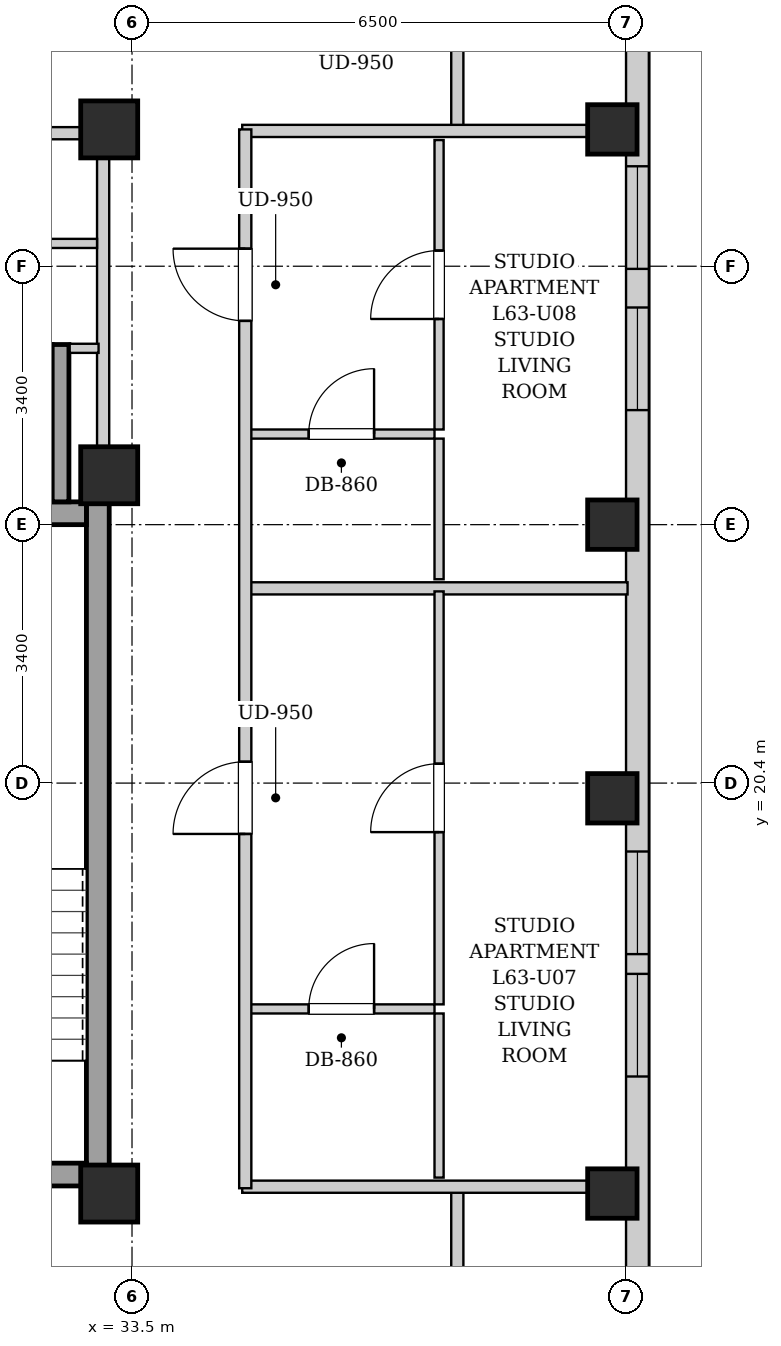
"""IFC4 building model, lengths in metres.
Left out: names, types, materials, properties, quantities, classifications, styles, units other than length and angle.
Written with IfcOpenShell. Run it as: python <this file> out.ifc"""

import sys

from ifc_helpers import new_model, si_unit, direction, frame, frame_2d, origin, origin_2d, place, context, subcontext, project, spatial, rectangle, extrude, element, fill, save


model = new_model("IFC4")
c1 = context("Model", 3, precision=1e-05, world=origin(), true_north=direction((0.0, 1.0)))
c2 = subcontext(c1, "Body", "Model", "MODEL_VIEW")
j1 = project(units=[si_unit("LENGTHUNIT", "METRE"), si_unit("PLANEANGLEUNIT", "RADIAN")], contexts=[c1])
p1 = place(None, origin())
s1 = spatial("IfcSite", under=j1, at=p1, CompositionType="ELEMENT")
p2 = place(p1, origin())
s2 = spatial("IfcBuilding", under=s1, at=p2, CompositionType="ELEMENT")
p3 = place(p2, frame((0.0, 0.0, 217.3)))
s3 = spatial("IfcBuildingStorey", under=s2, at=p3, CompositionType="ELEMENT", Elevation=217.3)
for number, where, z_axis, x_axis in (
    (1, (39.82, 15.0, 0.0), (0.0, 0.0, 1.0), (1.0, 0.0, 0.0)),
    (2, (39.82, 20.2, 0.0), (0.0, 0.0, 1.0), (1.0, 0.0, 0.0)),
    (3, (39.82, 23.8, 0.0), (0.0, 0.0, 1.0), (1.0, 0.0, 0.0)),
    (4, (39.82, 29.0, 0.0), (0.0, 0.0, 1.0), (1.0, 0.0, 0.0)),
):
    element("IfcColumn", number, at=place(p3, frame(where, z_axis=z_axis, x_axis=x_axis)), inside=s3, PredefinedType="COLUMN", context=c2, shape_type="SweptSolid", body=[
        extrude(rectangle(XDim=0.65, YDim=0.65, at=origin_2d()), origin(), (0.0, 0.0, 1.0), 3.4),
    ])
for number, where, z_axis, x_axis in (
    (5, (33.2, 15.0, 0.0), (0.0, 0.0, 1.0), (1.0, 0.0, 0.0)),
    (6, (33.2, 29.0, 0.0), (0.0, 0.0, 1.0), (1.0, 0.0, 0.0)),
    (7, (33.2, 24.45, 0.0), (0.0, 0.0, 1.0), (1.0, 0.0, 0.0)),
):
    element("IfcColumn", number, at=place(p3, frame(where, z_axis=z_axis, x_axis=x_axis)), inside=s3, PredefinedType="COLUMN", context=c2, shape_type="SweptSolid", body=[
        extrude(rectangle(XDim=0.75, YDim=0.75, at=origin_2d()), origin(), (0.0, 0.0, 1.0), 3.4),
    ])
p4 = place(p3, frame((40.15, 37.7, 0.0), z_axis=(0.0, 0.0, 1.0), x_axis=(0.0, -1.0, 0.0)))
e8 = element("IfcWall", 8, at=p4, inside=s3, PredefinedType="SOLIDWALL", context=c2, shape_type="SweptSolid", body=[
    extrude(rectangle(XDim=31.4, YDim=0.3, at=frame_2d((15.7, 0.0))), origin(), (0.0, 0.0, 1.0), 3.14),
])
p5 = place(p4, frame((28.546, 0.0, 0.55)))
e9 = element("IfcOpeningElement", 9, at=p5, cuts=e8, PredefinedType="OPENING", context=c2, shape_type="SweptSolid", body=[
    extrude(rectangle(XDim=1.35, YDim=1.2, at=frame_2d((0.675, 0.6))), frame((0.0, 0.16, 0.0), z_axis=(0.0, -1.0, 0.0), x_axis=(1.0, 0.0, 0.0)), (0.0, 0.0, 1.0), 0.32),
])
p6 = place(p4, frame((1.504, 0.0, 0.55)))
e10 = element("IfcOpeningElement", 10, at=p6, cuts=e8, PredefinedType="OPENING", context=c2, shape_type="SweptSolid", body=[
    extrude(rectangle(XDim=1.35, YDim=1.2, at=frame_2d((0.675, 0.6))), frame((0.0, 0.16, 0.0), z_axis=(0.0, -1.0, 0.0), x_axis=(1.0, 0.0, 0.0)), (0.0, 0.0, 1.0), 0.32),
])
p7 = place(p4, frame((18.2, 0.0, 0.55)))
e11 = element("IfcOpeningElement", 11, at=p7, cuts=e8, PredefinedType="OPENING", context=c2, shape_type="SweptSolid", body=[
    extrude(rectangle(XDim=1.35, YDim=1.2, at=frame_2d((0.675, 0.6))), frame((0.0, 0.16, 0.0), z_axis=(0.0, -1.0, 0.0), x_axis=(1.0, 0.0, 0.0)), (0.0, 0.0, 1.0), 0.32),
])
p8 = place(p4, frame((19.81, 0.0, 0.55)))
e12 = element("IfcOpeningElement", 12, at=p8, cuts=e8, PredefinedType="OPENING", context=c2, shape_type="SweptSolid", body=[
    extrude(rectangle(XDim=1.35, YDim=1.2, at=frame_2d((0.675, 0.6))), frame((0.0, 0.16, 0.0), z_axis=(0.0, -1.0, 0.0), x_axis=(1.0, 0.0, 0.0)), (0.0, 0.0, 1.0), 0.32),
])
p9 = place(p4, frame((11.043, 0.0, 0.55)))
e13 = element("IfcOpeningElement", 13, at=p9, cuts=e8, PredefinedType="OPENING", context=c2, shape_type="SweptSolid", body=[
    extrude(rectangle(XDim=1.35, YDim=1.2, at=frame_2d((0.675, 0.6))), frame((0.0, 0.16, 0.0), z_axis=(0.0, -1.0, 0.0), x_axis=(1.0, 0.0, 0.0)), (0.0, 0.0, 1.0), 0.32),
])
p10 = place(p4, frame((9.185, 0.0, 0.55)))
e14 = element("IfcOpeningElement", 14, at=p10, cuts=e8, PredefinedType="OPENING", context=c2, shape_type="SweptSolid", body=[
    extrude(rectangle(XDim=1.35, YDim=1.2, at=frame_2d((0.675, 0.6))), frame((0.0, 0.16, 0.0), z_axis=(0.0, -1.0, 0.0), x_axis=(1.0, 0.0, 0.0)), (0.0, 0.0, 1.0), 0.32),
])
p11 = place(p3, frame((33.05, 15.1, 0.0), z_axis=(0.0, 0.0, 1.0), x_axis=(0.0, 1.0, 0.0)))
e15 = element("IfcWall", 15, at=p11, inside=s3, PredefinedType="SHEAR", context=c2, shape_type="SweptSolid", body=[
    extrude(rectangle(XDim=9.0, YDim=0.3, at=frame_2d((4.5, 0.0))), origin(), (0.0, 0.0, 1.0), 3.14),
])
p12 = place(p3, frame((30.05, 23.95, 0.0), z_axis=(0.0, 0.0, 1.0), x_axis=(1.0, 0.0, 0.0)))
e16 = element("IfcWall", 16, at=p12, inside=s3, PredefinedType="SHEAR", context=c2, shape_type="SweptSolid", body=[
    extrude(rectangle(XDim=2.85, YDim=0.3, at=frame_2d((1.425, 0.0))), origin(), (0.0, 0.0, 1.0), 3.14),
])
p13 = place(p3, frame((30.05, 15.25, 0.0), z_axis=(0.0, 0.0, 1.0), x_axis=(1.0, 0.0, 0.0)))
e17 = element("IfcWall", 17, at=p13, inside=s3, PredefinedType="SHEAR", context=c2, shape_type="SweptSolid", body=[
    extrude(rectangle(XDim=2.85, YDim=0.3, at=frame_2d((1.425, 0.0))), origin(), (0.0, 0.0, 1.0), 3.14),
])
p14 = place(p13, frame((0.86, 0.0, 0.0)))
e18 = element("IfcOpeningElement", 18, at=p14, cuts=e17, PredefinedType="OPENING", context=c2, shape_type="SweptSolid", body=[
    extrude(rectangle(XDim=1.1, YDim=2.05, at=frame_2d((0.55, 1.025))), frame((0.0, 0.16, 0.0), z_axis=(0.0, -1.0, 0.0), x_axis=(1.0, 0.0, 0.0)), (0.0, 0.0, 1.0), 0.32),
])
p15 = place(p3, frame((32.56, 24.1, 0.0), z_axis=(0.0, 0.0, 1.0), x_axis=(0.0, 1.0, 0.0)))
e19 = element("IfcWall", 19, at=p15, inside=s3, PredefinedType="SHEAR", context=c2, shape_type="SweptSolid", body=[
    extrude(rectangle(XDim=2.07, YDim=0.22, at=frame_2d((1.035, 0.0))), origin(), (0.0, 0.0, 1.0), 3.14),
])
p16 = place(p3, frame((33.12, 24.12, 0.0), z_axis=(0.0, 0.0, 1.0), x_axis=(0.0, 1.0, 0.0)))
e20 = element("IfcWall", 20, at=p16, inside=s3, PredefinedType="PARTITIONING", context=c2, shape_type="SweptSolid", body=[
    extrude(rectangle(XDim=4.76, YDim=0.16, at=frame_2d((2.38, 0.0))), origin(), (0.0, 0.0, 1.0), 2.475),
])
p17 = place(p3, frame((32.68, 26.12, 0.0), z_axis=(0.0, 0.0, 1.0), x_axis=(1.0, 0.0, 0.0)))
e21 = element("IfcWall", 21, at=p17, inside=s3, PredefinedType="PARTITIONING", context=c2, shape_type="SweptSolid", body=[
    extrude(rectangle(XDim=0.38, YDim=0.12, at=frame_2d((0.19, 0.0))), origin(), (0.0, 0.0, 1.0), 3.14),
])
p18 = place(p3, frame((30.12, 27.5, 0.0), z_axis=(0.0, 0.0, 1.0), x_axis=(1.0, 0.0, 0.0)))
e22 = element("IfcWall", 22, at=p18, inside=s3, PredefinedType="PARTITIONING", context=c2, shape_type="SweptSolid", body=[
    extrude(rectangle(XDim=2.92, YDim=0.12, at=frame_2d((1.46, 0.0))), origin(), (0.0, 0.0, 1.0), 3.14),
])
p19 = place(p18, frame((0.97, 0.0, 0.0)))
e23 = element("IfcOpeningElement", 23, at=p19, cuts=e22, PredefinedType="OPENING", context=c2, shape_type="SweptSolid", body=[
    extrude(rectangle(XDim=0.86, YDim=2.05, at=frame_2d((0.43, 1.025))), frame((0.0, 0.07, 0.0), z_axis=(0.0, -1.0, 0.0), x_axis=(1.0, 0.0, 0.0)), (0.0, 0.0, 1.0), 0.14),
])
p20 = place(p3, frame((25.72, 28.95, 0.0), z_axis=(0.0, 0.0, 1.0), x_axis=(1.0, 0.0, 0.0)))
e24 = element("IfcWall", 24, at=p20, inside=s3, PredefinedType="PARTITIONING", context=c2, shape_type="SweptSolid", body=[
    extrude(rectangle(XDim=7.32, YDim=0.16, at=frame_2d((3.66, 0.0))), origin(), (0.0, 0.0, 1.0), 2.668),
])
p21 = place(p20, frame((1.27, 0.0, 0.0)))
e25 = element("IfcOpeningElement", 25, at=p21, cuts=e24, PredefinedType="OPENING", context=c2, shape_type="SweptSolid", body=[
    extrude(rectangle(XDim=0.86, YDim=2.05, at=frame_2d((0.43, 1.025))), frame((0.0, 0.09, 0.0), z_axis=(0.0, -1.0, 0.0), x_axis=(1.0, 0.0, 0.0)), (0.0, 0.0, 1.0), 0.18),
])
for number, where, z_axis, x_axis in (
    (26, (37.78, 13.51, 0.0), (0.0, 0.0, 1.0), (0.0, 1.0, 0.0)),
    (27, (37.78, 28.98, 0.0), (0.0, 0.0, 1.0), (0.0, 1.0, 0.0)),
):
    element("IfcWall", number, at=place(p3, frame(where, z_axis=z_axis, x_axis=x_axis)), inside=s3, PredefinedType="PARTITIONING", context=c2, shape_type="SweptSolid", body=[
        extrude(rectangle(XDim=1.58, YDim=0.16, at=frame_2d((0.79, 0.0))), origin(), (0.0, 0.0, 1.0), 3.14),
    ])
for number, where, z_axis, x_axis in (
    (28, (34.95, 15.09, 0.0), (0.0, 0.0, 1.0), (1.0, 0.0, 0.0)),
    (29, (34.95, 28.98, 0.0), (0.0, 0.0, 1.0), (1.0, 0.0, 0.0)),
):
    element("IfcWall", number, at=place(p3, frame(where, z_axis=z_axis, x_axis=x_axis)), inside=s3, PredefinedType="PARTITIONING", context=c2, shape_type="SweptSolid", body=[
        extrude(rectangle(XDim=5.07, YDim=0.16, at=frame_2d((2.535, 0.0))), origin(), (0.0, 0.0, 1.0), 2.668),
    ])
p22 = place(p3, frame((35.03, 22.962, 0.0), z_axis=(0.0, 0.0, 1.0), x_axis=(1.0, 0.0, 0.0)))
e30 = element("IfcWall", 30, at=p22, inside=s3, PredefinedType="PARTITIONING", context=c2, shape_type="SweptSolid", body=[
    extrude(rectangle(XDim=4.99, YDim=0.16, at=frame_2d((2.495, 0.0))), origin(), (0.0, 0.0, 1.0), 3.14),
])
p23 = place(p3, frame((35.03, 17.429, 0.0), z_axis=(0.0, 0.0, 1.0), x_axis=(1.0, 0.0, 0.0)))
e31 = element("IfcWall", 31, at=p23, inside=s3, PredefinedType="PARTITIONING", context=c2, shape_type="SweptSolid", body=[
    extrude(rectangle(XDim=2.45, YDim=0.12, at=frame_2d((1.225, 0.0))), origin(), (0.0, 0.0, 1.0), 3.14),
])
p24 = place(p23, frame((0.795, 0.0, 0.0)))
e32 = element("IfcOpeningElement", 32, at=p24, cuts=e31, PredefinedType="OPENING", context=c2, shape_type="SweptSolid", body=[
    extrude(rectangle(XDim=0.86, YDim=2.05, at=frame_2d((0.43, 1.025))), frame((0.0, 0.07, 0.0), z_axis=(0.0, -1.0, 0.0), x_axis=(1.0, 0.0, 0.0)), (0.0, 0.0, 1.0), 0.14),
])
p25 = place(p3, frame((37.54, 15.21, 0.0), z_axis=(0.0, 0.0, 1.0), x_axis=(0.0, 1.0, 0.0)))
e33 = element("IfcWall", 33, at=p25, inside=s3, PredefinedType="PARTITIONING", context=c2, shape_type="SweptSolid", body=[
    extrude(rectangle(XDim=2.159, YDim=0.12, at=frame_2d((1.08, 0.0))), origin(), (0.0, 0.0, 1.0), 3.14),
])
p26 = place(p3, frame((37.54, 17.489, 0.0), z_axis=(0.0, 0.0, 1.0), x_axis=(0.0, 1.0, 0.0)))
e34 = element("IfcWall", 34, at=p26, inside=s3, PredefinedType="PARTITIONING", context=c2, shape_type="SweptSolid", body=[
    extrude(rectangle(XDim=5.433, YDim=0.12, at=frame_2d((2.717, 0.0))), origin(), (0.0, 0.0, 1.0), 3.14),
])
p27 = place(p26, frame((2.266, 0.0, 0.0)))
e35 = element("IfcOpeningElement", 35, at=p27, cuts=e34, PredefinedType="OPENING", context=c2, shape_type="SweptSolid", body=[
    extrude(rectangle(XDim=0.9, YDim=2.05, at=frame_2d((0.45, 1.025))), frame((0.0, 0.07, 0.0), z_axis=(0.0, -1.0, 0.0), x_axis=(1.0, 0.0, 0.0)), (0.0, 0.0, 1.0), 0.14),
])
p28 = place(p3, frame((35.03, 24.992, 0.0), z_axis=(0.0, 0.0, 1.0), x_axis=(1.0, 0.0, 0.0)))
e36 = element("IfcWall", 36, at=p28, inside=s3, PredefinedType="PARTITIONING", context=c2, shape_type="SweptSolid", body=[
    extrude(rectangle(XDim=2.45, YDim=0.12, at=frame_2d((1.225, 0.0))), origin(), (0.0, 0.0, 1.0), 3.14),
])
p29 = place(p28, frame((0.795, 0.0, 0.0)))
e37 = element("IfcOpeningElement", 37, at=p29, cuts=e36, PredefinedType="OPENING", context=c2, shape_type="SweptSolid", body=[
    extrude(rectangle(XDim=0.86, YDim=2.05, at=frame_2d((0.43, 1.025))), frame((0.0, 0.07, 0.0), z_axis=(0.0, -1.0, 0.0), x_axis=(1.0, 0.0, 0.0)), (0.0, 0.0, 1.0), 0.14),
])
p30 = place(p3, frame((37.54, 23.082, 0.0), z_axis=(0.0, 0.0, 1.0), x_axis=(0.0, 1.0, 0.0)))
e38 = element("IfcWall", 38, at=p30, inside=s3, PredefinedType="PARTITIONING", context=c2, shape_type="SweptSolid", body=[
    extrude(rectangle(XDim=1.85, YDim=0.12, at=frame_2d((0.925, 0.0))), origin(), (0.0, 0.0, 1.0), 3.14),
])
p31 = place(p3, frame((37.54, 25.052, 0.0), z_axis=(0.0, 0.0, 1.0), x_axis=(0.0, 1.0, 0.0)))
e39 = element("IfcWall", 39, at=p31, inside=s3, PredefinedType="PARTITIONING", context=c2, shape_type="SweptSolid", body=[
    extrude(rectangle(XDim=3.808, YDim=0.12, at=frame_2d((1.904, 0.0))), origin(), (0.0, 0.0, 1.0), 3.14),
])
p32 = place(p31, frame((1.454, 0.0, 0.0)))
e40 = element("IfcOpeningElement", 40, at=p32, cuts=e39, PredefinedType="OPENING", context=c2, shape_type="SweptSolid", body=[
    extrude(rectangle(XDim=0.9, YDim=2.05, at=frame_2d((0.45, 1.025))), frame((0.0, 0.07, 0.0), z_axis=(0.0, -1.0, 0.0), x_axis=(1.0, 0.0, 0.0)), (0.0, 0.0, 1.0), 0.14),
])
p33 = place(p3, frame((34.99, 15.07, 0.0), z_axis=(0.0, 0.0, 1.0), x_axis=(0.0, 1.0, 0.0)))
e41 = element("IfcWall", 41, at=p33, inside=s3, PredefinedType="PARTITIONING", context=c2, shape_type="SweptSolid", body=[
    extrude(rectangle(XDim=13.93, YDim=0.16, at=frame_2d((6.965, 0.0))), origin(), (0.0, 0.0, 1.0), 3.14),
])
p34 = place(p33, frame((4.661, 0.0, 0.0)))
e42 = element("IfcOpeningElement", 42, at=p34, cuts=e41, PredefinedType="OPENING", context=c2, shape_type="SweptSolid", body=[
    extrude(rectangle(XDim=0.95, YDim=2.1, at=frame_2d((0.475, 1.05))), frame((0.0, 0.09, 0.0), z_axis=(0.0, -1.0, 0.0), x_axis=(1.0, 0.0, 0.0)), (0.0, 0.0, 1.0), 0.18),
])
p35 = place(p33, frame((11.411, 0.0, 0.0)))
e43 = element("IfcOpeningElement", 43, at=p35, cuts=e41, PredefinedType="OPENING", context=c2, shape_type="SweptSolid", body=[
    extrude(rectangle(XDim=0.95, YDim=2.1, at=frame_2d((0.475, 1.05))), frame((0.0, 0.09, 0.0), z_axis=(0.0, -1.0, 0.0), x_axis=(1.0, 0.0, 0.0)), (0.0, 0.0, 1.0), 0.18),
])
p36 = place(p24, origin())
e44 = element("IfcDoor", 44, at=p36, inside=s3, OperationType="SINGLE_SWING_RIGHT", PredefinedType="DOOR", context=c2, shape_type="SweptSolid", body=[
    extrude(rectangle(XDim=0.86, YDim=2.05, at=frame_2d((0.43, 1.025))), frame((0.0, 0.025, 0.0), z_axis=(0.0, -1.0, 0.0), x_axis=(1.0, 0.0, 0.0)), (0.0, 0.0, 1.0), 0.05),
])
fill(e32, e44)
p37 = place(p27, origin())
e45 = element("IfcDoor", 45, at=p37, inside=s3, OperationType="SINGLE_SWING_LEFT", PredefinedType="DOOR", context=c2, shape_type="SweptSolid", body=[
    extrude(rectangle(XDim=0.9, YDim=2.05, at=frame_2d((0.45, 1.025))), frame((0.0, 0.025, 0.0), z_axis=(0.0, -1.0, 0.0), x_axis=(1.0, 0.0, 0.0)), (0.0, 0.0, 1.0), 0.05),
])
fill(e35, e45)
p38 = place(p29, origin())
e46 = element("IfcDoor", 46, at=p38, inside=s3, OperationType="SINGLE_SWING_RIGHT", PredefinedType="DOOR", context=c2, shape_type="SweptSolid", body=[
    extrude(rectangle(XDim=0.86, YDim=2.05, at=frame_2d((0.43, 1.025))), frame((0.0, 0.025, 0.0), z_axis=(0.0, -1.0, 0.0), x_axis=(1.0, 0.0, 0.0)), (0.0, 0.0, 1.0), 0.05),
])
fill(e37, e46)
p39 = place(p32, origin())
e47 = element("IfcDoor", 47, at=p39, inside=s3, OperationType="SINGLE_SWING_LEFT", PredefinedType="DOOR", context=c2, shape_type="SweptSolid", body=[
    extrude(rectangle(XDim=0.9, YDim=2.05, at=frame_2d((0.45, 1.025))), frame((0.0, 0.025, 0.0), z_axis=(0.0, -1.0, 0.0), x_axis=(1.0, 0.0, 0.0)), (0.0, 0.0, 1.0), 0.05),
])
fill(e40, e47)
p40 = place(p34, origin())
e48 = element("IfcDoor", 48, at=p40, inside=s3, OperationType="SINGLE_SWING_LEFT", PredefinedType="DOOR", context=c2, shape_type="SweptSolid", body=[
    extrude(rectangle(XDim=0.95, YDim=2.1, at=frame_2d((0.475, 1.05))), frame((0.0, 0.025, 0.0), z_axis=(0.0, -1.0, 0.0), x_axis=(1.0, 0.0, 0.0)), (0.0, 0.0, 1.0), 0.05),
])
fill(e42, e48)
p41 = place(p35, origin())
e49 = element("IfcDoor", 49, at=p41, inside=s3, OperationType="SINGLE_SWING_RIGHT", PredefinedType="DOOR", context=c2, shape_type="SweptSolid", body=[
    extrude(rectangle(XDim=0.95, YDim=2.1, at=frame_2d((0.475, 1.05))), frame((0.0, 0.025, 0.0), z_axis=(0.0, -1.0, 0.0), x_axis=(1.0, 0.0, 0.0)), (0.0, 0.0, 1.0), 0.05),
])
fill(e43, e49)
p42 = place(p7, origin())
e50 = element("IfcWindow", 50, at=p42, inside=s3, PartitioningType="SINGLE_PANEL", PredefinedType="WINDOW", context=c2, shape_type="SweptSolid", body=[
    extrude(rectangle(XDim=1.35, YDim=1.2, at=frame_2d((0.675, 0.6))), frame((0.0, 0.03, 0.0), z_axis=(0.0, -1.0, 0.0), x_axis=(1.0, 0.0, 0.0)), (0.0, 0.0, 1.0), 0.06),
])
fill(e11, e50)
p43 = place(p8, origin())
e51 = element("IfcWindow", 51, at=p43, inside=s3, PartitioningType="SINGLE_PANEL", PredefinedType="WINDOW", context=c2, shape_type="SweptSolid", body=[
    extrude(rectangle(XDim=1.35, YDim=1.2, at=frame_2d((0.675, 0.6))), frame((0.0, 0.03, 0.0), z_axis=(0.0, -1.0, 0.0), x_axis=(1.0, 0.0, 0.0)), (0.0, 0.0, 1.0), 0.06),
])
fill(e12, e51)
p44 = place(p9, origin())
e52 = element("IfcWindow", 52, at=p44, inside=s3, PartitioningType="SINGLE_PANEL", PredefinedType="WINDOW", context=c2, shape_type="SweptSolid", body=[
    extrude(rectangle(XDim=1.35, YDim=1.2, at=frame_2d((0.675, 0.6))), frame((0.0, 0.03, 0.0), z_axis=(0.0, -1.0, 0.0), x_axis=(1.0, 0.0, 0.0)), (0.0, 0.0, 1.0), 0.06),
])
fill(e13, e52)
p45 = place(p10, origin())
e53 = element("IfcWindow", 53, at=p45, inside=s3, PartitioningType="SINGLE_PANEL", PredefinedType="WINDOW", context=c2, shape_type="SweptSolid", body=[
    extrude(rectangle(XDim=1.35, YDim=1.2, at=frame_2d((0.675, 0.6))), frame((0.0, 0.03, 0.0), z_axis=(0.0, -1.0, 0.0), x_axis=(1.0, 0.0, 0.0)), (0.0, 0.0, 1.0), 0.06),
])
fill(e14, e53)
save(model, sys.argv[1])
